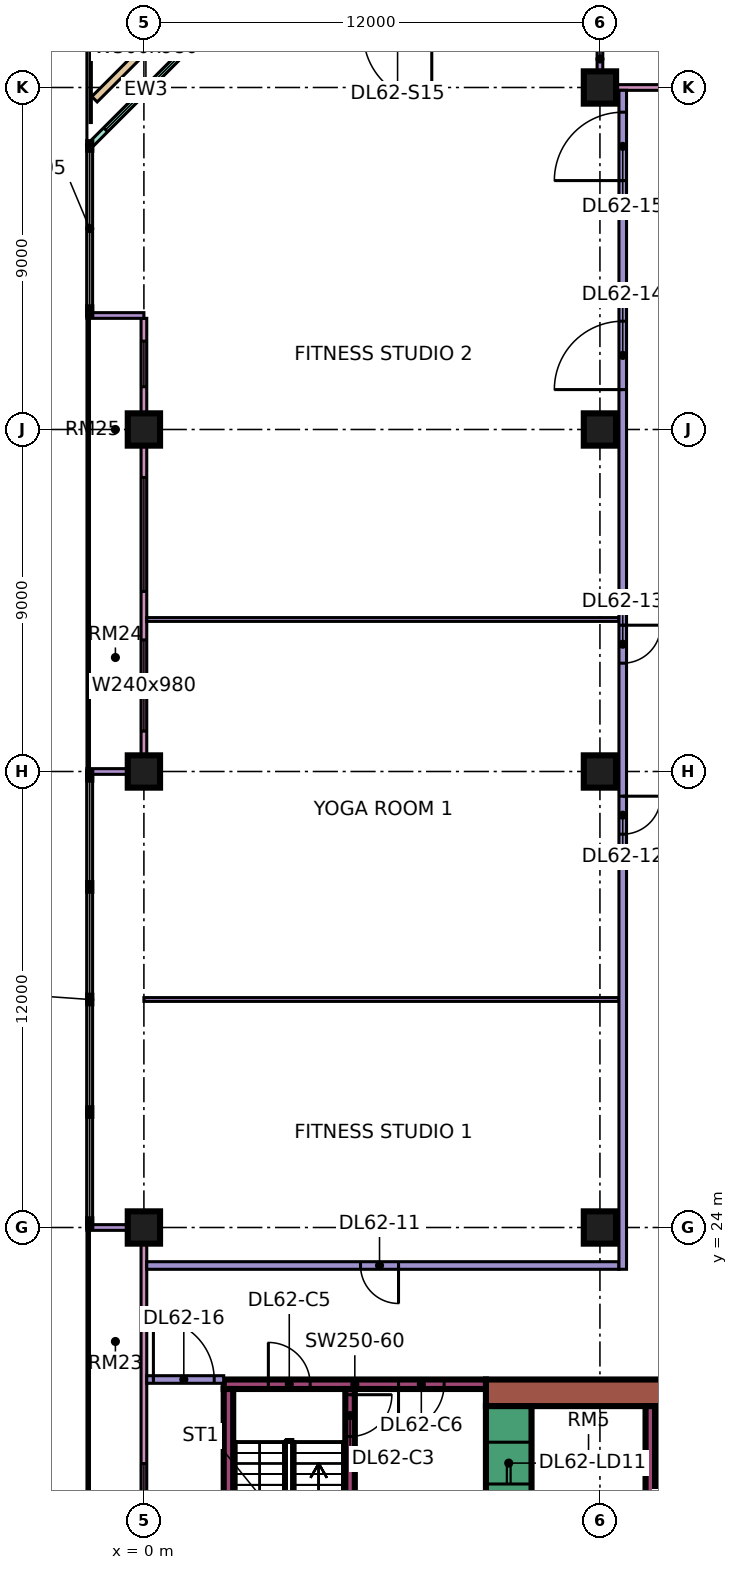
"""IFC4 building model, lengths in metres.
Left out: names, types, materials, properties, quantities, classifications, styles, units other than length and angle.
Written with IfcOpenShell. Run it as: python <this file> out.ifc"""

import sys

from ifc_helpers import new_model, si_unit, direction, frame, frame_2d, origin, origin_2d, place, context, subcontext, project, spatial, rectangle, extrude, element, fill, save


model = new_model("IFC4")
c1 = context("Model", 3, precision=1e-05, world=origin(), true_north=direction((0.0, 1.0)))
c2 = subcontext(c1, "Body", "Model", "MODEL_VIEW")
j1 = project(units=[si_unit("LENGTHUNIT", "METRE"), si_unit("PLANEANGLEUNIT", "RADIAN")], contexts=[c1])
p1 = place(None, origin())
s1 = spatial("IfcSite", under=j1, at=p1, CompositionType="ELEMENT")
p2 = place(p1, origin())
s2 = spatial("IfcBuilding", under=s1, at=p2, CompositionType="ELEMENT")
p3 = place(p2, frame((0.0, 0.0, 262.15)))
s3 = spatial("IfcBuildingStorey", under=s2, at=p3, CompositionType="ELEMENT", Elevation=262.15)
for number, where, z_axis, x_axis in (
    (1, (0.0, 24.0, 0.0), (0.0, 0.0, 1.0), (1.0, 0.0, 0.0)),
    (2, (0.0, 36.0, 0.0), (0.0, 0.0, 1.0), (1.0, 0.0, 0.0)),
    (3, (0.0, 45.0, 0.0), (0.0, 0.0, 1.0), (1.0, 0.0, 0.0)),
    (4, (12.0, 24.0, 0.0), (0.0, 0.0, 1.0), (1.0, 0.0, 0.0)),
    (5, (12.0, 36.0, 0.0), (0.0, 0.0, 1.0), (1.0, 0.0, 0.0)),
    (6, (12.0, 45.0, 0.0), (0.0, 0.0, 1.0), (1.0, 0.0, 0.0)),
    (7, (12.0, 54.0, 0.0), (0.0, 0.0, 1.0), (1.0, 0.0, 0.0)),
):
    element("IfcColumn", number, at=place(p3, frame(where, z_axis=z_axis, x_axis=x_axis)), inside=s3, PredefinedType="COLUMN", context=c2, shape_type="SweptSolid", body=[
        extrude(rectangle(XDim=0.85, YDim=0.85, at=origin_2d()), origin(), (0.0, 0.0, 1.0), 11.25),
    ])
p4 = place(p3, frame((9.0, 19.65, 0.0), z_axis=(0.0, 0.0, 1.0), x_axis=(1.0, 0.0, 0.0)))
e8 = element("IfcWall", 8, at=p4, inside=s3, PredefinedType="SHEAR", context=c2, shape_type="SweptSolid", body=[
    extrude(rectangle(XDim=25.0, YDim=0.7, at=frame_2d((12.5, 0.0))), origin(), (0.0, 0.0, 1.0), 11.25),
])
p5 = place(p4, frame((19.1, 0.0, 0.0)))
e9 = element("IfcOpeningElement", 9, at=p5, cuts=e8, PredefinedType="OPENING", context=c2, shape_type="SweptSolid", body=[
    extrude(rectangle(XDim=1.8, YDim=2.4, at=frame_2d((0.9, 1.2))), frame((0.0, 0.36, 0.0), z_axis=(0.0, -1.0, 0.0), x_axis=(1.0, 0.0, 0.0)), (0.0, 0.0, 1.0), 0.72),
])
p6 = place(p3, frame((9.6, 7.7, 0.0), z_axis=(0.0, 0.0, 1.0), x_axis=(0.0, 1.0, 0.0)))
e10 = element("IfcWall", 10, at=p6, inside=s3, PredefinedType="SHEAR", context=c2, shape_type="SweptSolid", body=[
    extrude(rectangle(XDim=11.6, YDim=1.2, at=frame_2d((5.8, 0.0))), origin(), (0.0, 0.0, 1.0), 11.25),
])
p7 = place(p6, frame((4.175, 0.0, 0.0)))
e11 = element("IfcOpeningElement", 11, at=p7, cuts=e10, PredefinedType="OPENING", context=c2, shape_type="SweptSolid", body=[
    extrude(rectangle(XDim=1.1, YDim=2.2, at=frame_2d((0.55, 1.1))), frame((0.0, 0.61, 0.0), z_axis=(0.0, -1.0, 0.0), x_axis=(1.0, 0.0, 0.0)), (0.0, 0.0, 1.0), 1.22),
])
p8 = place(p6, frame((6.675, 0.0, 0.0)))
e12 = element("IfcOpeningElement", 12, at=p8, cuts=e10, PredefinedType="OPENING", context=c2, shape_type="SweptSolid", body=[
    extrude(rectangle(XDim=1.1, YDim=2.2, at=frame_2d((0.55, 1.1))), frame((0.0, 0.61, 0.0), z_axis=(0.0, -1.0, 0.0), x_axis=(1.0, 0.0, 0.0)), (0.0, 0.0, 1.0), 1.22),
])
p9 = place(p6, frame((9.55, 0.0, 0.0)))
e13 = element("IfcOpeningElement", 13, at=p9, cuts=e10, PredefinedType="OPENING", context=c2, shape_type="SweptSolid", body=[
    extrude(rectangle(XDim=1.1, YDim=2.2, at=frame_2d((0.55, 1.1))), frame((0.0, 0.61, 0.0), z_axis=(0.0, -1.0, 0.0), x_axis=(1.0, 0.0, 0.0)), (0.0, 0.0, 1.0), 1.22),
])
p10 = place(p6, frame((1.85, 0.0, 0.0)))
e14 = element("IfcOpeningElement", 14, at=p10, cuts=e10, PredefinedType="OPENING", context=c2, shape_type="SweptSolid", body=[
    extrude(rectangle(XDim=0.9, YDim=2.1, at=frame_2d((0.45, 1.05))), frame((0.0, 0.61, 0.0), z_axis=(0.0, -1.0, 0.0), x_axis=(1.0, 0.0, 0.0)), (0.0, 0.0, 1.0), 1.22),
])
p11 = place(p3, frame((13.325, 7.7, 0.0), z_axis=(0.0, 0.0, 1.0), x_axis=(0.0, 1.0, 0.0)))
e15 = element("IfcWall", 15, at=p11, inside=s3, PredefinedType="SHEAR", context=c2, shape_type="SweptSolid", body=[
    extrude(rectangle(XDim=11.6, YDim=0.25, at=frame_2d((5.8, 0.0))), origin(), (0.0, 0.0, 1.0), 11.25),
])
p12 = place(p3, frame((2.1, 19.875, 0.0), z_axis=(0.0, 0.0, 1.0), x_axis=(1.0, 0.0, 0.0)))
e16 = element("IfcWall", 16, at=p12, inside=s3, PredefinedType="SHEAR", context=c2, shape_type="SweptSolid", body=[
    extrude(rectangle(XDim=6.9, YDim=0.25, at=frame_2d((3.45, 0.0))), origin(), (0.0, 0.0, 1.0), 11.25),
])
p13 = place(p12, frame((1.175, 0.0, 0.0)))
e17 = element("IfcOpeningElement", 17, at=p13, cuts=e16, PredefinedType="OPENING", context=c2, shape_type="SweptSolid", body=[
    extrude(rectangle(XDim=1.1, YDim=2.2, at=frame_2d((0.55, 1.1))), frame((0.0, 0.135, 0.0), z_axis=(0.0, -1.0, 0.0), x_axis=(1.0, 0.0, 0.0)), (0.0, 0.0, 1.0), 0.27),
])
p14 = place(p12, frame((4.6, 0.0, 0.0)))
e18 = element("IfcOpeningElement", 18, at=p14, cuts=e16, PredefinedType="OPENING", context=c2, shape_type="SweptSolid", body=[
    extrude(rectangle(XDim=1.2, YDim=2.2, at=frame_2d((0.6, 1.1))), frame((0.0, 0.135, 0.0), z_axis=(0.0, -1.0, 0.0), x_axis=(1.0, 0.0, 0.0)), (0.0, 0.0, 1.0), 0.27),
])
p15 = place(p3, frame((2.225, 13.25, 0.0), z_axis=(0.0, 0.0, 1.0), x_axis=(0.0, 1.0, 0.0)))
e19 = element("IfcWall", 19, at=p15, inside=s3, PredefinedType="SHEAR", context=c2, shape_type="SweptSolid", body=[
    extrude(rectangle(XDim=6.5, YDim=0.25, at=frame_2d((3.25, 0.0))), origin(), (0.0, 0.0, 1.0), 11.25),
])
p16 = place(p3, frame((5.425, 13.25, 0.0), z_axis=(0.0, 0.0, 1.0), x_axis=(0.0, 1.0, 0.0)))
e20 = element("IfcWall", 20, at=p16, inside=s3, PredefinedType="SHEAR", context=c2, shape_type="SweptSolid", body=[
    extrude(rectangle(XDim=6.5, YDim=0.25, at=frame_2d((3.25, 0.0))), origin(), (0.0, 0.0, 1.0), 11.25),
])
p17 = place(p16, frame((5.25, 0.0, 0.0)))
e21 = element("IfcOpeningElement", 21, at=p17, cuts=e20, PredefinedType="OPENING", context=c2, shape_type="SweptSolid", body=[
    extrude(rectangle(XDim=1.1, YDim=2.2, at=frame_2d((0.55, 1.1))), frame((0.0, 0.135, 0.0), z_axis=(0.0, -1.0, 0.0), x_axis=(1.0, 0.0, 0.0)), (0.0, 0.0, 1.0), 0.27),
])
p18 = place(p3, frame((22.425, 54.0, 0.0), z_axis=(0.0, 0.0, 1.0), x_axis=(-1.0, 0.0, 0.0)))
e22 = element("IfcWall", 22, at=p18, inside=s3, PredefinedType="SOLIDWALL", context=c2, shape_type="SweptSolid", body=[
    extrude(rectangle(XDim=10.35, YDim=0.15, at=frame_2d((5.175, 0.0))), origin(), (0.0, 0.0, 1.0), 10.85),
])
p19 = place(p18, frame((1.913, 0.0, 0.45)))
e23 = element("IfcOpeningElement", 23, at=p19, cuts=e22, PredefinedType="OPENING", context=c2, shape_type="SweptSolid", body=[
    extrude(rectangle(XDim=3.0, YDim=9.8, at=frame_2d((1.5, 4.9))), frame((0.0, 0.085, 0.0), z_axis=(0.0, -1.0, 0.0), x_axis=(1.0, 0.0, 0.0)), (0.0, 0.0, 1.0), 0.17),
])
p20 = place(p3, frame((12.0, 55.5, 0.0), z_axis=(0.0, 0.0, 1.0), x_axis=(0.0, -1.0, 0.0)))
e24 = element("IfcWall", 24, at=p20, inside=s3, PredefinedType="SOLIDWALL", context=c2, shape_type="SweptSolid", body=[
    extrude(rectangle(XDim=1.5, YDim=0.15, at=frame_2d((0.75, 0.0))), origin(), (0.0, 0.0, 1.0), 10.85),
])
p21 = place(p3, frame((1.553, 55.447, 0.0), z_axis=(0.0, 0.0, 1.0), x_axis=(-0.707106781187, -0.707106781187, 0.0)))
e25 = element("IfcWall", 25, at=p21, inside=s3, PredefinedType="SOLIDWALL", context=c2, shape_type="SweptSolid", body=[
    extrude(rectangle(XDim=4.243, YDim=0.15, at=frame_2d((2.121, 0.0))), origin(), (0.0, 0.0, 1.0), 10.85),
])
p22 = place(p21, frame((0.621, 0.0, 0.45)))
e26 = element("IfcOpeningElement", 26, at=p22, cuts=e25, PredefinedType="OPENING", context=c2, shape_type="SweptSolid", body=[
    extrude(rectangle(XDim=3.0, YDim=9.8, at=frame_2d((1.5, 4.9))), frame((0.0, 0.085, 0.0), z_axis=(0.0, -1.0, 0.0), x_axis=(1.0, 0.0, 0.0)), (0.0, 0.0, 1.0), 0.17),
])
p23 = place(p3, frame((0.0, 47.925, 0.0), z_axis=(0.0, 0.0, 1.0), x_axis=(0.0, -1.0, 0.0)))
e27 = element("IfcWall", 27, at=p23, inside=s3, PredefinedType="SOLIDWALL", context=c2, shape_type="SweptSolid", body=[
    extrude(rectangle(XDim=11.85, YDim=0.15, at=frame_2d((5.925, 0.0))), origin(), (0.0, 0.0, 1.0), 10.85),
])
p24 = place(p23, frame((0.6, 0.0, 0.45)))
e28 = element("IfcOpeningElement", 28, at=p24, cuts=e27, PredefinedType="OPENING", context=c2, shape_type="SweptSolid", body=[
    extrude(rectangle(XDim=1.2, YDim=9.8, at=frame_2d((0.6, 4.9))), frame((0.0, 0.085, 0.0), z_axis=(0.0, -1.0, 0.0), x_axis=(1.0, 0.0, 0.0)), (0.0, 0.0, 1.0), 0.17),
])
p25 = place(p23, frame((4.188, 0.0, 0.45)))
e29 = element("IfcOpeningElement", 29, at=p25, cuts=e27, PredefinedType="OPENING", context=c2, shape_type="SweptSolid", body=[
    extrude(rectangle(XDim=3.0, YDim=9.8, at=frame_2d((1.5, 4.9))), frame((0.0, 0.085, 0.0), z_axis=(0.0, -1.0, 0.0), x_axis=(1.0, 0.0, 0.0)), (0.0, 0.0, 1.0), 0.17),
])
p26 = place(p23, frame((8.462, 0.0, 0.45)))
e30 = element("IfcOpeningElement", 30, at=p26, cuts=e27, PredefinedType="OPENING", context=c2, shape_type="SweptSolid", body=[
    extrude(rectangle(XDim=2.4, YDim=9.8, at=frame_2d((1.2, 4.9))), frame((0.0, 0.085, 0.0), z_axis=(0.0, -1.0, 0.0), x_axis=(1.0, 0.0, 0.0)), (0.0, 0.0, 1.0), 0.17),
])
for number, where, z_axis, x_axis in (
    (31, (-1.5, 48.0, 0.0), (0.0, 0.0, 1.0), (1.0, 0.0, 0.0)),
    (32, (-1.5, 36.0, 0.0), (0.0, 0.0, 1.0), (1.0, 0.0, 0.0)),
):
    element("IfcWall", number, at=place(p3, frame(where, z_axis=z_axis, x_axis=x_axis)), inside=s3, PredefinedType="SOLIDWALL", context=c2, shape_type="SweptSolid", body=[
        extrude(rectangle(XDim=1.5, YDim=0.15, at=frame_2d((0.75, 0.0))), origin(), (0.0, 0.0, 1.0), 10.85),
    ])
p27 = place(p3, frame((0.0, 23.925, 0.0), z_axis=(0.0, 0.0, 1.0), x_axis=(0.0, -1.0, 0.0)))
e33 = element("IfcWall", 33, at=p27, inside=s3, PredefinedType="SOLIDWALL", context=c2, shape_type="SweptSolid", body=[
    extrude(rectangle(XDim=11.35, YDim=0.15, at=frame_2d((5.675, 0.0))), origin(), (0.0, 0.0, 1.0), 10.85),
])
p28 = place(p27, frame((6.137, 0.0, 0.45)))
e34 = element("IfcOpeningElement", 34, at=p28, cuts=e33, PredefinedType="OPENING", context=c2, shape_type="SweptSolid", body=[
    extrude(rectangle(XDim=3.0, YDim=9.8, at=frame_2d((1.5, 4.9))), frame((0.0, 0.085, 0.0), z_axis=(0.0, -1.0, 0.0), x_axis=(1.0, 0.0, 0.0)), (0.0, 0.0, 1.0), 0.17),
])
p29 = place(p3, frame((-1.5, 24.0, 0.0), z_axis=(0.0, 0.0, 1.0), x_axis=(1.0, 0.0, 0.0)))
e35 = element("IfcWall", 35, at=p29, inside=s3, PredefinedType="SOLIDWALL", context=c2, shape_type="SweptSolid", body=[
    extrude(rectangle(XDim=1.5, YDim=0.15, at=frame_2d((0.75, 0.0))), origin(), (0.0, 0.0, 1.0), 10.85),
])
p30 = place(p3, frame((-1.3, 53.69, 0.0), z_axis=(0.0, 0.0, 1.0), x_axis=(0.707106781187, 0.707106781187, 0.0)))
e36 = element("IfcWall", 36, at=p30, inside=s3, PredefinedType="PARAPET", context=c2, shape_type="SweptSolid", body=[
    extrude(rectangle(XDim=3.55, YDim=0.2, at=frame_2d((1.775, 0.0))), origin(), (0.0, 0.0, 1.0), 0.5),
])
p31 = place(p3, frame((0.0, 30.0, 0.0), z_axis=(0.0, 0.0, 1.0), x_axis=(1.0, 0.0, 0.0)))
e37 = element("IfcWall", 37, at=p31, inside=s3, PredefinedType="PARTITIONING", context=c2, shape_type="SweptSolid", body=[
    extrude(rectangle(XDim=12.5, YDim=0.1, at=frame_2d((6.25, 0.0))), origin(), (0.0, 0.0, 1.0), 10.85),
])
p32 = place(p3, frame((0.074, 20.0, 0.0), z_axis=(0.0, 0.0, 1.0), x_axis=(1.0, 0.0, 0.0)))
e38 = element("IfcWall", 38, at=p32, inside=s3, PredefinedType="PARTITIONING", context=c2, shape_type="SweptSolid", body=[
    extrude(rectangle(XDim=2.026, YDim=0.2, at=frame_2d((1.013, 0.0))), origin(), (0.0, 0.0, 1.0), 10.85),
])
p33 = place(p32, frame((0.176, 0.0, 0.0)))
e39 = element("IfcOpeningElement", 39, at=p33, cuts=e38, PredefinedType="OPENING", context=c2, shape_type="SweptSolid", body=[
    extrude(rectangle(XDim=1.6, YDim=2.1, at=frame_2d((0.8, 1.05))), frame((0.0, 0.11, 0.0), z_axis=(0.0, -1.0, 0.0), x_axis=(1.0, 0.0, 0.0)), (0.0, 0.0, 1.0), 0.22),
])
p34 = place(p3, frame((0.074, 23.0, 0.0), z_axis=(0.0, 0.0, 1.0), x_axis=(1.0, 0.0, 0.0)))
e40 = element("IfcWall", 40, at=p34, inside=s3, PredefinedType="PARTITIONING", context=c2, shape_type="SweptSolid", body=[
    extrude(rectangle(XDim=12.426, YDim=0.2, at=frame_2d((6.213, 0.0))), origin(), (0.0, 0.0, 1.0), 10.85),
])
p35 = place(p34, frame((5.626, 0.0, 0.0)))
e41 = element("IfcOpeningElement", 41, at=p35, cuts=e40, PredefinedType="OPENING", context=c2, shape_type="SweptSolid", body=[
    extrude(rectangle(XDim=1.0, YDim=2.1, at=frame_2d((0.5, 1.05))), frame((0.0, 0.11, 0.0), z_axis=(0.0, -1.0, 0.0), x_axis=(1.0, 0.0, 0.0)), (0.0, 0.0, 1.0), 0.22),
])
p36 = place(p3, frame((0.074, 40.0, 0.0), z_axis=(0.0, 0.0, 1.0), x_axis=(1.0, 0.0, 0.0)))
e42 = element("IfcWall", 42, at=p36, inside=s3, PredefinedType="PARTITIONING", context=c2, shape_type="SweptSolid", body=[
    extrude(rectangle(XDim=12.426, YDim=0.1, at=frame_2d((6.213, 0.0))), origin(), (0.0, 0.0, 1.0), 10.85),
])
p37 = place(p3, frame((12.6, 22.9, 0.0), z_axis=(0.0, 0.0, 1.0), x_axis=(0.0, 1.0, 0.0)))
e43 = element("IfcWall", 43, at=p37, inside=s3, PredefinedType="PARTITIONING", context=c2, shape_type="SweptSolid", body=[
    extrude(rectangle(XDim=31.026, YDim=0.2, at=frame_2d((15.513, 0.0))), origin(), (0.0, 0.0, 1.0), 10.85),
])
p38 = place(p37, frame((11.45, 0.0, 0.0)))
e44 = element("IfcOpeningElement", 44, at=p38, cuts=e43, PredefinedType="OPENING", context=c2, shape_type="SweptSolid", body=[
    extrude(rectangle(XDim=1.0, YDim=2.1, at=frame_2d((0.5, 1.05))), frame((0.0, 0.11, 0.0), z_axis=(0.0, -1.0, 0.0), x_axis=(1.0, 0.0, 0.0)), (0.0, 0.0, 1.0), 0.22),
])
p39 = place(p37, frame((15.95, 0.0, 0.0)))
e45 = element("IfcOpeningElement", 45, at=p39, cuts=e43, PredefinedType="OPENING", context=c2, shape_type="SweptSolid", body=[
    extrude(rectangle(XDim=1.0, YDim=2.1, at=frame_2d((0.5, 1.05))), frame((0.0, 0.11, 0.0), z_axis=(0.0, -1.0, 0.0), x_axis=(1.0, 0.0, 0.0)), (0.0, 0.0, 1.0), 0.22),
])
p40 = place(p37, frame((23.15, 0.0, 0.0)))
e46 = element("IfcOpeningElement", 46, at=p40, cuts=e43, PredefinedType="OPENING", context=c2, shape_type="SweptSolid", body=[
    extrude(rectangle(XDim=1.8, YDim=2.1, at=frame_2d((0.9, 1.05))), frame((0.0, 0.11, 0.0), z_axis=(0.0, -1.0, 0.0), x_axis=(1.0, 0.0, 0.0)), (0.0, 0.0, 1.0), 0.22),
])
p41 = place(p37, frame((28.65, 0.0, 0.0)))
e47 = element("IfcOpeningElement", 47, at=p41, cuts=e43, PredefinedType="OPENING", context=c2, shape_type="SweptSolid", body=[
    extrude(rectangle(XDim=1.8, YDim=2.1, at=frame_2d((0.9, 1.05))), frame((0.0, 0.11, 0.0), z_axis=(0.0, -1.0, 0.0), x_axis=(1.0, 0.0, 0.0)), (0.0, 0.0, 1.0), 0.22),
])
p42 = place(p22, origin())
e48 = element("IfcWindow", 48, at=p42, inside=s3, PartitioningType="SINGLE_PANEL", PredefinedType="WINDOW", context=c2, shape_type="SweptSolid", body=[
    extrude(rectangle(XDim=3.0, YDim=9.8, at=frame_2d((1.5, 4.9))), frame((0.0, 0.03, 0.0), z_axis=(0.0, -1.0, 0.0), x_axis=(1.0, 0.0, 0.0)), (0.0, 0.0, 1.0), 0.06),
])
fill(e26, e48)
p43 = place(p24, origin())
e49 = element("IfcWindow", 49, at=p43, inside=s3, PartitioningType="SINGLE_PANEL", PredefinedType="WINDOW", context=c2, shape_type="SweptSolid", body=[
    extrude(rectangle(XDim=1.2, YDim=9.8, at=frame_2d((0.6, 4.9))), frame((0.0, 0.03, 0.0), z_axis=(0.0, -1.0, 0.0), x_axis=(1.0, 0.0, 0.0)), (0.0, 0.0, 1.0), 0.06),
])
fill(e28, e49)
p44 = place(p25, origin())
e50 = element("IfcWindow", 50, at=p44, inside=s3, PartitioningType="SINGLE_PANEL", PredefinedType="WINDOW", context=c2, shape_type="SweptSolid", body=[
    extrude(rectangle(XDim=3.0, YDim=9.8, at=frame_2d((1.5, 4.9))), frame((0.0, 0.03, 0.0), z_axis=(0.0, -1.0, 0.0), x_axis=(1.0, 0.0, 0.0)), (0.0, 0.0, 1.0), 0.06),
])
fill(e29, e50)
p45 = place(p26, origin())
e51 = element("IfcWindow", 51, at=p45, inside=s3, PartitioningType="SINGLE_PANEL", PredefinedType="WINDOW", context=c2, shape_type="SweptSolid", body=[
    extrude(rectangle(XDim=2.4, YDim=9.8, at=frame_2d((1.2, 4.9))), frame((0.0, 0.03, 0.0), z_axis=(0.0, -1.0, 0.0), x_axis=(1.0, 0.0, 0.0)), (0.0, 0.0, 1.0), 0.06),
])
fill(e30, e51)
p46 = place(p28, origin())
e52 = element("IfcWindow", 52, at=p46, inside=s3, PartitioningType="SINGLE_PANEL", PredefinedType="WINDOW", context=c2, shape_type="SweptSolid", body=[
    extrude(rectangle(XDim=3.0, YDim=9.8, at=frame_2d((1.5, 4.9))), frame((0.0, 0.03, 0.0), z_axis=(0.0, -1.0, 0.0), x_axis=(1.0, 0.0, 0.0)), (0.0, 0.0, 1.0), 0.06),
])
fill(e34, e52)
p47 = place(p9, origin())
e53 = element("IfcDoor", 53, at=p47, inside=s3, OperationType="DOUBLE_DOOR_SLIDING", PredefinedType="DOOR", context=c2, shape_type="SweptSolid", body=[
    extrude(rectangle(XDim=1.1, YDim=2.2, at=frame_2d((0.55, 1.1))), frame((0.0, 0.025, 0.0), z_axis=(0.0, -1.0, 0.0), x_axis=(1.0, 0.0, 0.0)), (0.0, 0.0, 1.0), 0.05),
])
fill(e13, e53)
p48 = place(p17, origin())
e54 = element("IfcDoor", 54, at=p48, inside=s3, OperationType="SINGLE_SWING_RIGHT", PredefinedType="DOOR", context=c2, shape_type="SweptSolid", body=[
    extrude(rectangle(XDim=1.1, YDim=2.2, at=frame_2d((0.55, 1.1))), frame((0.0, 0.025, 0.0), z_axis=(0.0, -1.0, 0.0), x_axis=(1.0, 0.0, 0.0)), (0.0, 0.0, 1.0), 0.05),
])
fill(e21, e54)
p49 = place(p13, origin())
e55 = element("IfcDoor", 55, at=p49, inside=s3, OperationType="SINGLE_SWING_LEFT", PredefinedType="DOOR", context=c2, shape_type="SweptSolid", body=[
    extrude(rectangle(XDim=1.1, YDim=2.2, at=frame_2d((0.55, 1.1))), frame((0.0, 0.025, 0.0), z_axis=(0.0, -1.0, 0.0), x_axis=(1.0, 0.0, 0.0)), (0.0, 0.0, 1.0), 0.05),
])
fill(e17, e55)
p50 = place(p14, frame((1.2, 0.0, 0.0), z_axis=(0.0, 0.0, 1.0), x_axis=(-1.0, 0.0, 0.0)))
e56 = element("IfcDoor", 56, at=p50, inside=s3, OperationType="SINGLE_SWING_LEFT", PredefinedType="DOOR", context=c2, shape_type="SweptSolid", body=[
    extrude(rectangle(XDim=1.2, YDim=2.2, at=frame_2d((0.6, 1.1))), frame((0.0, 0.025, 0.0), z_axis=(0.0, -1.0, 0.0), x_axis=(1.0, 0.0, 0.0)), (0.0, 0.0, 1.0), 0.05),
])
fill(e18, e56)
p51 = place(p35, origin())
e57 = element("IfcDoor", 57, at=p51, inside=s3, OperationType="SINGLE_SWING_RIGHT", PredefinedType="DOOR", context=c2, shape_type="SweptSolid", body=[
    extrude(rectangle(XDim=1.0, YDim=2.1, at=frame_2d((0.5, 1.05))), frame((0.0, 0.025, 0.0), z_axis=(0.0, -1.0, 0.0), x_axis=(1.0, 0.0, 0.0)), (0.0, 0.0, 1.0), 0.05),
])
fill(e41, e57)
p52 = place(p38, origin())
e58 = element("IfcDoor", 58, at=p52, inside=s3, OperationType="SINGLE_SWING_RIGHT", PredefinedType="DOOR", context=c2, shape_type="SweptSolid", body=[
    extrude(rectangle(XDim=1.0, YDim=2.1, at=frame_2d((0.5, 1.05))), frame((0.0, 0.025, 0.0), z_axis=(0.0, -1.0, 0.0), x_axis=(1.0, 0.0, 0.0)), (0.0, 0.0, 1.0), 0.05),
])
fill(e44, e58)
p53 = place(p39, origin())
e59 = element("IfcDoor", 59, at=p53, inside=s3, OperationType="SINGLE_SWING_RIGHT", PredefinedType="DOOR", context=c2, shape_type="SweptSolid", body=[
    extrude(rectangle(XDim=1.0, YDim=2.1, at=frame_2d((0.5, 1.05))), frame((0.0, 0.025, 0.0), z_axis=(0.0, -1.0, 0.0), x_axis=(1.0, 0.0, 0.0)), (0.0, 0.0, 1.0), 0.05),
])
fill(e45, e59)
p54 = place(p40, origin())
e60 = element("IfcDoor", 60, at=p54, inside=s3, OperationType="DOUBLE_DOOR_SINGLE_SWING", PredefinedType="DOOR", context=c2, shape_type="SweptSolid", body=[
    extrude(rectangle(XDim=1.8, YDim=2.1, at=frame_2d((0.9, 1.05))), frame((0.0, 0.025, 0.0), z_axis=(0.0, -1.0, 0.0), x_axis=(1.0, 0.0, 0.0)), (0.0, 0.0, 1.0), 0.05),
])
fill(e46, e60)
p55 = place(p41, origin())
e61 = element("IfcDoor", 61, at=p55, inside=s3, OperationType="DOUBLE_DOOR_SINGLE_SWING", PredefinedType="DOOR", context=c2, shape_type="SweptSolid", body=[
    extrude(rectangle(XDim=1.8, YDim=2.1, at=frame_2d((0.9, 1.05))), frame((0.0, 0.025, 0.0), z_axis=(0.0, -1.0, 0.0), x_axis=(1.0, 0.0, 0.0)), (0.0, 0.0, 1.0), 0.05),
])
fill(e47, e61)
p56 = place(p33, origin())
e62 = element("IfcDoor", 62, at=p56, inside=s3, OperationType="DOUBLE_DOOR_SINGLE_SWING", PredefinedType="DOOR", context=c2, shape_type="SweptSolid", body=[
    extrude(rectangle(XDim=1.6, YDim=2.1, at=frame_2d((0.8, 1.05))), frame((0.0, 0.025, 0.0), z_axis=(0.0, -1.0, 0.0), x_axis=(1.0, 0.0, 0.0)), (0.0, 0.0, 1.0), 0.05),
])
fill(e39, e62)
save(model, sys.argv[1])
